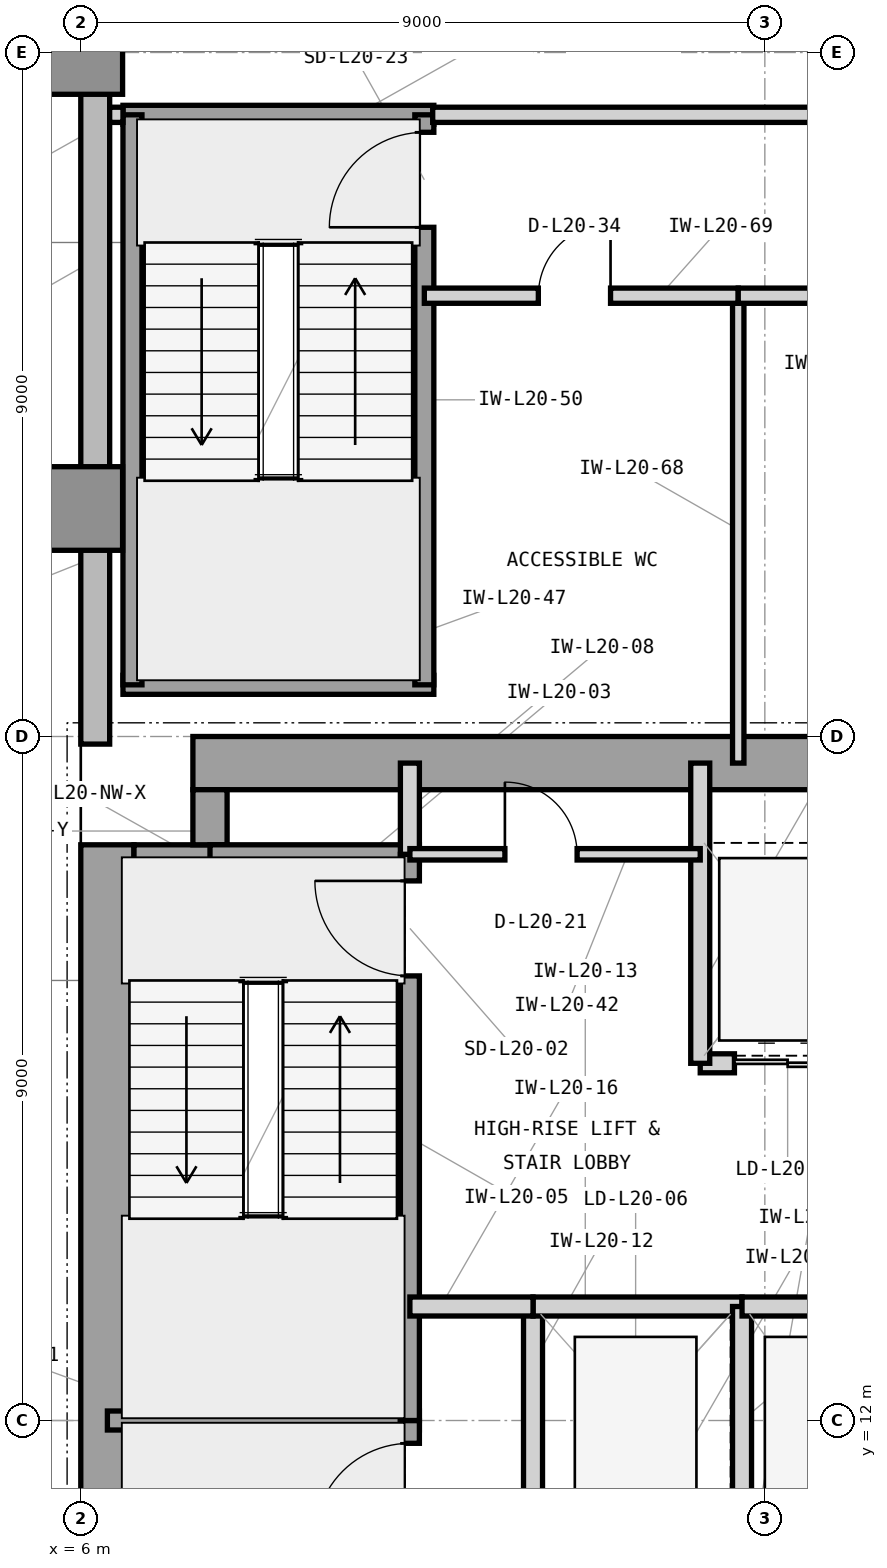
"""IFC4 building model, lengths in metres.
Left out: names, types, materials, properties, quantities, classifications, styles, units other than length and angle.
Written with IfcOpenShell. Run it as: python <this file> out.ifc"""

import sys

from ifc_helpers import new_model, si_unit, direction, frame, frame_2d, origin, origin_2d, place, context, subcontext, project, spatial, rectangle, extrude, element, fill, save


model = new_model("IFC4")
c1 = context("Model", 3, precision=1e-05, world=origin(), true_north=direction((0.0, 1.0)))
c2 = subcontext(c1, "Body", "Model", "MODEL_VIEW")
j1 = project(units=[si_unit("LENGTHUNIT", "METRE"), si_unit("PLANEANGLEUNIT", "RADIAN")], contexts=[c1])
p1 = place(None, origin())
s1 = spatial("IfcSite", under=j1, at=p1, CompositionType="ELEMENT")
p2 = place(p1, origin())
s2 = spatial("IfcBuilding", under=s1, at=p2, CompositionType="ELEMENT")
p3 = place(p2, frame((0.0, 0.0, 89.1)))
s3 = spatial("IfcBuildingStorey", under=s2, at=p3, CompositionType="ELEMENT", Elevation=89.1)
p4 = place(p3, frame((6.35, 4.425, 0.0), z_axis=(0.0, 0.0, 1.0), x_axis=(0.0, 1.0, 0.0)))
e1 = element("IfcWall", 1, at=p4, inside=s3, PredefinedType="SHEAR", context=c2, shape_type="SweptSolid", body=[
    extrude(rectangle(XDim=15.15, YDim=0.7, at=frame_2d((7.575, 0.0))), origin(), (0.0, 0.0, 1.0), 4.2),
])
p5 = place(p3, frame((7.475, 20.65, 0.0), z_axis=(0.0, 0.0, 1.0), x_axis=(1.0, 0.0, 0.0)))
e2 = element("IfcWall", 2, at=p5, inside=s3, PredefinedType="SHEAR", context=c2, shape_type="SweptSolid", body=[
    extrude(rectangle(XDim=12.325, YDim=0.7, at=frame_2d((6.163, 0.0))), origin(), (0.0, 0.0, 1.0), 4.2),
])
p6 = place(p3, frame((6.7, 19.35, 0.0), z_axis=(0.0, 0.0, 1.0), x_axis=(1.0, 0.0, 0.0)))
e3 = element("IfcWall", 3, at=p6, inside=s3, PredefinedType="SHEAR", context=c2, shape_type="SweptSolid", body=[
    extrude(rectangle(XDim=1.225, YDim=0.45, at=frame_2d((0.613, 0.0))), origin(), (0.0, 0.0, 1.0), 4.2),
])
p7 = place(p3, frame((7.7, 19.575, 0.0), z_axis=(0.0, 0.0, 1.0), x_axis=(0.0, 1.0, 0.0)))
e4 = element("IfcWall", 4, at=p7, inside=s3, PredefinedType="SHEAR", context=c2, shape_type="SweptSolid", body=[
    extrude(rectangle(XDim=0.725, YDim=0.45, at=frame_2d((0.363, 0.0))), origin(), (0.0, 0.0, 1.0), 4.2),
])
for number, where, z_axis, x_axis in (
    (5, (6.0, 24.0, 0.0), (0.0, 0.0, 1.0), (1.0, 0.0, 0.0)),
    (6, (6.0, 30.0, 0.0), (0.0, 0.0, 1.0), (1.0, 0.0, 0.0)),
):
    element("IfcColumn", number, at=place(p3, frame(where, z_axis=z_axis, x_axis=x_axis)), inside=s3, PredefinedType="COLUMN", context=c2, shape_type="SweptSolid", body=[
        extrude(rectangle(XDim=1.1, YDim=1.1, at=origin_2d()), origin(), (0.0, 0.0, 1.0), 4.2),
    ])
p8 = place(p3, frame((6.19, 46.4, 0.0), z_axis=(0.0, 0.0, 1.0), x_axis=(0.0, -1.0, 0.0)))
e7 = element("IfcWall", 7, at=p8, inside=s3, PredefinedType="STANDARD", context=c2, shape_type="SweptSolid", body=[
    extrude(rectangle(XDim=25.5, YDim=0.38, at=frame_2d((12.75, 0.0))), origin(), (0.0, 0.0, 1.0), 4.0),
])
p9 = place(p8, frame((11.984, 0.0, 0.7)))
e8 = element("IfcOpeningElement", 8, at=p9, cuts=e7, PredefinedType="OPENING", context=c2, shape_type="SweptSolid", body=[
    extrude(rectangle(XDim=3.0, YDim=2.6, at=frame_2d((1.5, 1.3))), frame((0.0, 0.2, 0.0), z_axis=(0.0, -1.0, 0.0), x_axis=(1.0, 0.0, 0.0)), (0.0, 0.0, 1.0), 0.4),
])
p10 = place(p8, frame((8.254, 0.0, 0.85)))
e9 = element("IfcOpeningElement", 9, at=p10, cuts=e7, PredefinedType="OPENING", context=c2, shape_type="SweptSolid", body=[
    extrude(rectangle(XDim=1.2, YDim=2.25, at=frame_2d((0.6, 1.125))), frame((0.0, 0.2, 0.0), z_axis=(0.0, -1.0, 0.0), x_axis=(1.0, 0.0, 0.0)), (0.0, 0.0, 1.0), 0.4),
])
p11 = place(p3, frame((6.35, 12.0, 0.0), z_axis=(0.0, 0.0, 1.0), x_axis=(1.0, 0.0, 0.0)))
e10 = element("IfcWall", 10, at=p11, inside=s3, PredefinedType="SHEAR", context=c2, shape_type="SweptSolid", body=[
    extrude(rectangle(XDim=4.105, YDim=0.25, at=frame_2d((2.052, 0.0))), origin(), (0.0, 0.0, 1.0), 4.2),
])
p12 = place(p3, frame((7.7, 19.45, 0.0), z_axis=(0.0, 0.0, 1.0), x_axis=(1.0, 0.0, 0.0)))
e11 = element("IfcWall", 11, at=p12, inside=s3, PredefinedType="SHEAR", context=c2, shape_type="SweptSolid", body=[
    extrude(rectangle(XDim=2.755, YDim=0.25, at=frame_2d((1.377, 0.0))), origin(), (0.0, 0.0, 1.0), 4.2),
])
p13 = place(p3, frame((10.33, 4.55, 0.0), z_axis=(0.0, 0.0, 1.0), x_axis=(0.0, 1.0, 0.0)))
e12 = element("IfcWall", 12, at=p13, inside=s3, PredefinedType="SHEAR", context=c2, shape_type="SweptSolid", body=[
    extrude(rectangle(XDim=7.45, YDim=0.25, at=frame_2d((3.725, 0.0))), origin(), (0.0, 0.0, 1.0), 4.2),
])
p14 = place(p13, frame((5.9, 0.0, 0.0)))
e13 = element("IfcOpeningElement", 13, at=p14, cuts=e12, PredefinedType="OPENING", context=c2, shape_type="SweptSolid", body=[
    extrude(rectangle(XDim=1.25, YDim=2.2, at=frame_2d((0.625, 1.1))), frame((0.0, 0.135, 0.0), z_axis=(0.0, -1.0, 0.0), x_axis=(1.0, 0.0, 0.0)), (0.0, 0.0, 1.0), 0.27),
])
p15 = place(p3, frame((10.33, 12.0, 0.0), z_axis=(0.0, 0.0, 1.0), x_axis=(0.0, 1.0, 0.0)))
e14 = element("IfcWall", 14, at=p15, inside=s3, PredefinedType="SHEAR", context=c2, shape_type="SweptSolid", body=[
    extrude(rectangle(XDim=7.45, YDim=0.25, at=frame_2d((3.725, 0.0))), origin(), (0.0, 0.0, 1.0), 4.2),
])
p16 = place(p15, frame((5.85, 0.0, 0.0)))
e15 = element("IfcOpeningElement", 15, at=p16, cuts=e14, PredefinedType="OPENING", context=c2, shape_type="SweptSolid", body=[
    extrude(rectangle(XDim=1.25, YDim=2.2, at=frame_2d((0.625, 1.1))), frame((0.0, 0.135, 0.0), z_axis=(0.0, -1.0, 0.0), x_axis=(1.0, 0.0, 0.0)), (0.0, 0.0, 1.0), 0.27),
])
p17 = place(p3, frame((10.33, 19.45, 0.0), z_axis=(0.0, 0.0, 1.0), x_axis=(0.0, 1.0, 0.0)))
e16 = element("IfcWall", 16, at=p17, inside=s3, PredefinedType="PARTITIONING", context=c2, shape_type="SweptSolid", body=[
    extrude(rectangle(XDim=1.2, YDim=0.25, at=frame_2d((0.6, 0.0))), origin(), (0.0, 0.0, 1.0), 3.217),
])
p18 = place(p3, frame((11.95, 10.5, 0.0), z_axis=(0.0, 0.0, 1.0), x_axis=(0.0, 1.0, 0.0)))
e17 = element("IfcWall", 17, at=p18, inside=s3, PredefinedType="PARTITIONING", context=c2, shape_type="SweptSolid", body=[
    extrude(rectangle(XDim=3.0, YDim=0.25, at=frame_2d((1.5, 0.0))), origin(), (0.0, 0.0, 1.0), 3.93),
])
p19 = place(p3, frame((11.95, 13.5, 0.0), z_axis=(0.0, 0.0, 1.0), x_axis=(1.0, 0.0, 0.0)))
e18 = element("IfcWall", 18, at=p19, inside=s3, PredefinedType="PARTITIONING", context=c2, shape_type="SweptSolid", body=[
    extrude(rectangle(XDim=2.75, YDim=0.25, at=frame_2d((1.375, 0.0))), origin(), (0.0, 0.0, 1.0), 3.527),
])
p20 = place(p3, frame((14.7, 10.5, 0.0), z_axis=(0.0, 0.0, 1.0), x_axis=(0.0, 1.0, 0.0)))
e19 = element("IfcWall", 19, at=p20, inside=s3, PredefinedType="PARTITIONING", context=c2, shape_type="SweptSolid", body=[
    extrude(rectangle(XDim=3.0, YDim=0.25, at=frame_2d((1.5, 0.0))), origin(), (0.0, 0.0, 1.0), 3.93),
])
p21 = place(p3, frame((10.33, 13.5, 0.0), z_axis=(0.0, 0.0, 1.0), x_axis=(1.0, 0.0, 0.0)))
e20 = element("IfcWall", 20, at=p21, inside=s3, PredefinedType="PARTITIONING", context=c2, shape_type="SweptSolid", body=[
    extrude(rectangle(XDim=1.62, YDim=0.25, at=frame_2d((0.81, 0.0))), origin(), (0.0, 0.0, 1.0), 3.527),
])
p22 = place(p3, frame((14.15, 16.7, 0.0), z_axis=(0.0, 0.0, 1.0), x_axis=(1.0, 0.0, 0.0)))
e21 = element("IfcWall", 21, at=p22, inside=s3, PredefinedType="PARTITIONING", context=c2, shape_type="SweptSolid", body=[
    extrude(rectangle(XDim=2.3, YDim=0.25, at=frame_2d((1.15, 0.0))), origin(), (0.0, 0.0, 1.0), 3.527),
])
p23 = place(p22, frame((0.45, 0.0, 0.0)))
e22 = element("IfcOpeningElement", 22, at=p23, cuts=e21, PredefinedType="OPENING", context=c2, shape_type="SweptSolid", body=[
    extrude(rectangle(XDim=1.4, YDim=2.35, at=frame_2d((0.7, 1.175))), frame((0.0, 0.135, 0.0), z_axis=(0.0, -1.0, 0.0), x_axis=(1.0, 0.0, 0.0)), (0.0, 0.0, 1.0), 0.27),
])
p24 = place(p3, frame((14.15, 16.7, 0.0), z_axis=(0.0, 0.0, 1.0), x_axis=(0.0, 1.0, 0.0)))
e23 = element("IfcWall", 23, at=p24, inside=s3, PredefinedType="PARTITIONING", context=c2, shape_type="SweptSolid", body=[
    extrude(rectangle(XDim=3.95, YDim=0.25, at=frame_2d((1.975, 0.0))), origin(), (0.0, 0.0, 1.0), 3.93),
])
p25 = place(p3, frame((14.7, 13.5, 0.0), z_axis=(0.0, 0.0, 1.0), x_axis=(1.0, 0.0, 0.0)))
e24 = element("IfcWall", 24, at=p25, inside=s3, PredefinedType="PARTITIONING", context=c2, shape_type="SweptSolid", body=[
    extrude(rectangle(XDim=8.95, YDim=0.25, at=frame_2d((4.475, 0.0))), origin(), (0.0, 0.0, 1.0), 3.527),
])
p26 = place(p3, frame((10.33, 19.45, 0.0), z_axis=(0.0, 0.0, 1.0), x_axis=(1.0, 0.0, 0.0)))
e25 = element("IfcWall", 25, at=p26, inside=s3, PredefinedType="PARTITIONING", context=c2, shape_type="SweptSolid", body=[
    extrude(rectangle(XDim=3.82, YDim=0.15, at=frame_2d((1.91, 0.0))), origin(), (0.0, 0.0, 1.0), 3.93),
])
p27 = place(p26, frame((1.25, 0.0, 0.0)))
e26 = element("IfcOpeningElement", 26, at=p27, cuts=e25, PredefinedType="OPENING", context=c2, shape_type="SweptSolid", body=[
    extrude(rectangle(XDim=0.95, YDim=2.1, at=frame_2d((0.475, 1.05))), frame((0.0, 0.085, 0.0), z_axis=(0.0, -1.0, 0.0), x_axis=(1.0, 0.0, 0.0)), (0.0, 0.0, 1.0), 0.17),
])
for number, where, z_axis, x_axis in (
    (27, (6.555, 21.68, 0.0), (0.0, 0.0, 1.0), (1.0, 0.0, 0.0)),
    (28, (6.555, 29.18, 0.0), (0.0, 0.0, 1.0), (1.0, 0.0, 0.0)),
):
    element("IfcWall", number, at=place(p3, frame(where, z_axis=z_axis, x_axis=x_axis)), inside=s3, PredefinedType="SHEAR", context=c2, shape_type="SweptSolid", body=[
        extrude(rectangle(XDim=4.09, YDim=0.25, at=frame_2d((2.045, 0.0))), origin(), (0.0, 0.0, 1.0), 4.2),
    ])
p28 = place(p3, frame((6.68, 21.68, 0.0), z_axis=(0.0, 0.0, 1.0), x_axis=(0.0, 1.0, 0.0)))
e29 = element("IfcWall", 29, at=p28, inside=s3, PredefinedType="SHEAR", context=c2, shape_type="SweptSolid", body=[
    extrude(rectangle(XDim=7.5, YDim=0.25, at=frame_2d((3.75, 0.0))), origin(), (0.0, 0.0, 1.0), 4.2),
])
p29 = place(p3, frame((10.52, 21.68, 0.0), z_axis=(0.0, 0.0, 1.0), x_axis=(0.0, 1.0, 0.0)))
e30 = element("IfcWall", 30, at=p29, inside=s3, PredefinedType="SHEAR", context=c2, shape_type="SweptSolid", body=[
    extrude(rectangle(XDim=7.5, YDim=0.25, at=frame_2d((3.75, 0.0))), origin(), (0.0, 0.0, 1.0), 4.2),
])
p30 = place(p29, frame((6.02, 0.0, 0.0)))
e31 = element("IfcOpeningElement", 31, at=p30, cuts=e30, PredefinedType="OPENING", context=c2, shape_type="SweptSolid", body=[
    extrude(rectangle(XDim=1.25, YDim=2.2, at=frame_2d((0.625, 1.1))), frame((0.0, 0.135, 0.0), z_axis=(0.0, -1.0, 0.0), x_axis=(1.0, 0.0, 0.0)), (0.0, 0.0, 1.0), 0.27),
])
p31 = place(p3, frame((14.65, 20.65, 0.0), z_axis=(0.0, 0.0, 1.0), x_axis=(0.0, 1.0, 0.0)))
e32 = element("IfcWall", 32, at=p31, inside=s3, PredefinedType="PARTITIONING", context=c2, shape_type="SweptSolid", body=[
    extrude(rectangle(XDim=6.15, YDim=0.15, at=frame_2d((3.075, 0.0))), origin(), (0.0, 0.0, 1.0), 3.93),
])
p32 = place(p3, frame((10.52, 26.8, 0.0), z_axis=(0.0, 0.0, 1.0), x_axis=(1.0, 0.0, 0.0)))
e33 = element("IfcWall", 33, at=p32, inside=s3, PredefinedType="PARTITIONING", context=c2, shape_type="SweptSolid", body=[
    extrude(rectangle(XDim=4.13, YDim=0.2, at=frame_2d((2.065, 0.0))), origin(), (0.0, 0.0, 1.0), 3.93),
])
p33 = place(p32, frame((1.5, 0.0, 0.0)))
e34 = element("IfcOpeningElement", 34, at=p33, cuts=e33, PredefinedType="OPENING", context=c2, shape_type="SweptSolid", body=[
    extrude(rectangle(XDim=0.95, YDim=2.1, at=frame_2d((0.475, 1.05))), frame((0.0, 0.11, 0.0), z_axis=(0.0, -1.0, 0.0), x_axis=(1.0, 0.0, 0.0)), (0.0, 0.0, 1.0), 0.22),
])
p34 = place(p3, frame((14.65, 26.8, 0.0), z_axis=(0.0, 0.0, 1.0), x_axis=(1.0, 0.0, 0.0)))
e35 = element("IfcWall", 35, at=p34, inside=s3, PredefinedType="PARTITIONING", context=c2, shape_type="SweptSolid", body=[
    extrude(rectangle(XDim=5.15, YDim=0.2, at=frame_2d((2.575, 0.0))), origin(), (0.0, 0.0, 1.0), 3.93),
])
p35 = place(p34, frame((1.8, 0.0, 0.0)))
e36 = element("IfcOpeningElement", 36, at=p35, cuts=e35, PredefinedType="OPENING", context=c2, shape_type="SweptSolid", body=[
    extrude(rectangle(XDim=0.95, YDim=2.1, at=frame_2d((0.475, 1.05))), frame((0.0, 0.11, 0.0), z_axis=(0.0, -1.0, 0.0), x_axis=(1.0, 0.0, 0.0)), (0.0, 0.0, 1.0), 0.22),
])
p36 = place(p3, frame((6.38, 29.18, 0.0), z_axis=(0.0, 0.0, 1.0), x_axis=(1.0, 0.0, 0.0)))
e37 = element("IfcWall", 37, at=p36, inside=s3, PredefinedType="PARTITIONING", context=c2, shape_type="SweptSolid", body=[
    extrude(rectangle(XDim=0.175, YDim=0.2, at=frame_2d((0.087, 0.0))), origin(), (0.0, 0.0, 1.0), 3.93),
])
p37 = place(p3, frame((10.63, 29.18, 0.0), z_axis=(0.0, 0.0, 1.0), x_axis=(1.0, 0.0, 0.0)))
e38 = element("IfcWall", 38, at=p37, inside=s3, PredefinedType="PARTITIONING", context=c2, shape_type="SweptSolid", body=[
    extrude(rectangle(XDim=10.17, YDim=0.2, at=frame_2d((5.085, 0.0))), origin(), (0.0, 0.0, 1.0), 3.93),
])
p38 = place(p14, origin())
e39 = element("IfcDoor", 39, at=p38, inside=s3, OperationType="SINGLE_SWING_LEFT", PredefinedType="DOOR", context=c2, shape_type="SweptSolid", body=[
    extrude(rectangle(XDim=1.25, YDim=2.2, at=frame_2d((0.625, 1.1))), frame((0.0, 0.025, 0.0), z_axis=(0.0, -1.0, 0.0), x_axis=(1.0, 0.0, 0.0)), (0.0, 0.0, 1.0), 0.05),
])
fill(e13, e39)
p39 = place(p16, origin())
e40 = element("IfcDoor", 40, at=p39, inside=s3, OperationType="SINGLE_SWING_RIGHT", PredefinedType="DOOR", context=c2, shape_type="SweptSolid", body=[
    extrude(rectangle(XDim=1.25, YDim=2.2, at=frame_2d((0.625, 1.1))), frame((0.0, 0.025, 0.0), z_axis=(0.0, -1.0, 0.0), x_axis=(1.0, 0.0, 0.0)), (0.0, 0.0, 1.0), 0.05),
])
fill(e15, e40)
p40 = place(p23, origin())
e41 = element("IfcDoor", 41, at=p40, inside=s3, OperationType="DOUBLE_DOOR_SLIDING", PredefinedType="DOOR", context=c2, shape_type="SweptSolid", body=[
    extrude(rectangle(XDim=1.4, YDim=2.35, at=frame_2d((0.7, 1.175))), frame((0.0, 0.025, 0.0), z_axis=(0.0, -1.0, 0.0), x_axis=(1.0, 0.0, 0.0)), (0.0, 0.0, 1.0), 0.05),
])
fill(e22, e41)
p41 = place(p27, origin())
e42 = element("IfcDoor", 42, at=p41, inside=s3, OperationType="SINGLE_SWING_LEFT", PredefinedType="DOOR", context=c2, shape_type="SweptSolid", body=[
    extrude(rectangle(XDim=0.95, YDim=2.1, at=frame_2d((0.475, 1.05))), frame((0.0, 0.025, 0.0), z_axis=(0.0, -1.0, 0.0), x_axis=(1.0, 0.0, 0.0)), (0.0, 0.0, 1.0), 0.05),
])
fill(e26, e42)
p42 = place(p30, origin())
e43 = element("IfcDoor", 43, at=p42, inside=s3, OperationType="SINGLE_SWING_LEFT", PredefinedType="DOOR", context=c2, shape_type="SweptSolid", body=[
    extrude(rectangle(XDim=1.25, YDim=2.2, at=frame_2d((0.625, 1.1))), frame((0.0, 0.025, 0.0), z_axis=(0.0, -1.0, 0.0), x_axis=(1.0, 0.0, 0.0)), (0.0, 0.0, 1.0), 0.05),
])
fill(e31, e43)
p43 = place(p33, origin())
e44 = element("IfcDoor", 44, at=p43, inside=s3, OperationType="SINGLE_SWING_RIGHT", PredefinedType="DOOR", context=c2, shape_type="SweptSolid", body=[
    extrude(rectangle(XDim=0.95, YDim=2.1, at=frame_2d((0.475, 1.05))), frame((0.0, 0.025, 0.0), z_axis=(0.0, -1.0, 0.0), x_axis=(1.0, 0.0, 0.0)), (0.0, 0.0, 1.0), 0.05),
])
fill(e34, e44)
save(model, sys.argv[1])
